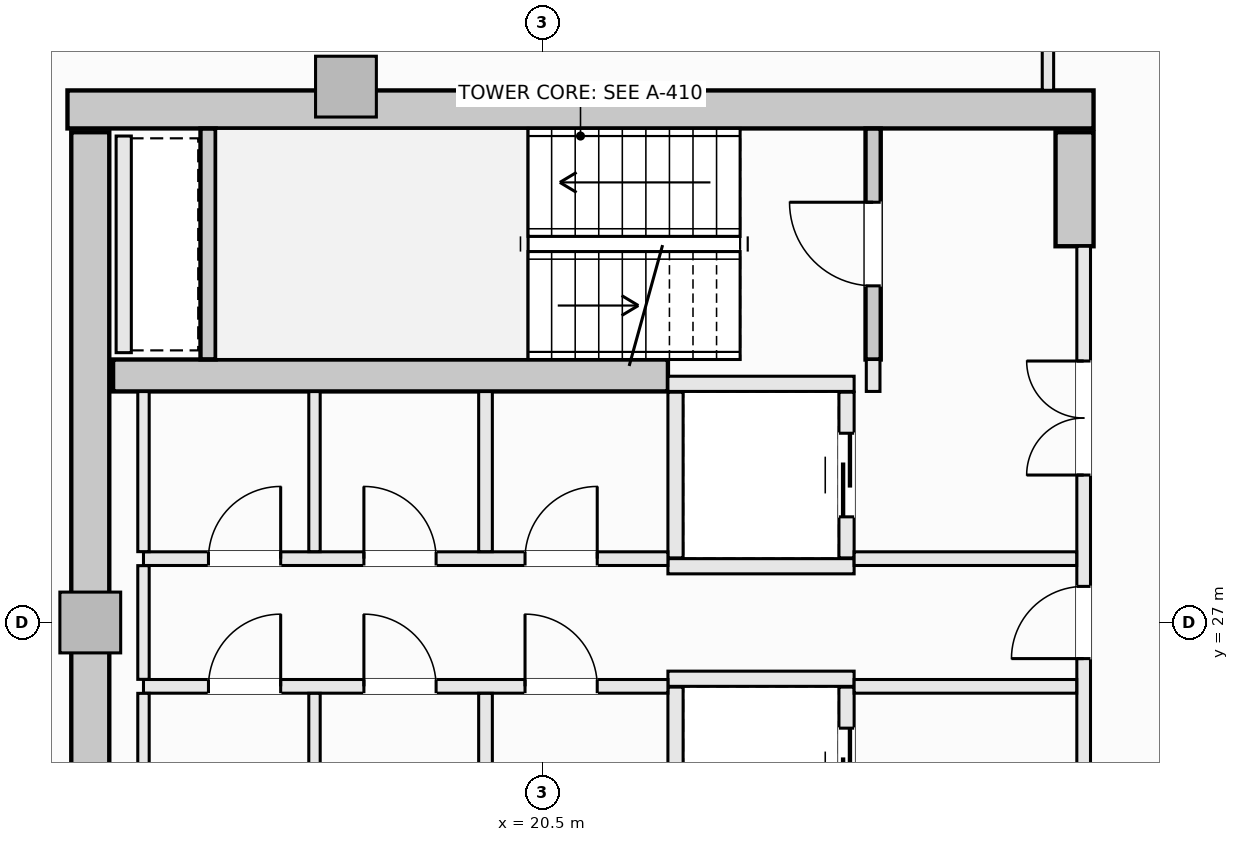
"""IFC4 building model, lengths in metres.
Left out: names, types, materials, properties, quantities, classifications, styles, units other than length and angle.
Written with IfcOpenShell. Run it as: python <this file> out.ifc"""

import sys

from ifc_helpers import new_model, si_unit, direction, frame, frame_2d, origin, origin_2d, place, context, subcontext, project, spatial, rectangle, extrude, element, fill, save


model = new_model("IFC4")
c1 = context("Model", 3, precision=1e-05, world=origin(), true_north=direction((0.0, 1.0)))
c2 = subcontext(c1, "Body", "Model", "MODEL_VIEW")
j1 = project(units=[si_unit("LENGTHUNIT", "METRE"), si_unit("PLANEANGLEUNIT", "RADIAN")], contexts=[c1])
p1 = place(None, origin())
s1 = spatial("IfcSite", under=j1, at=p1, CompositionType="ELEMENT")
p2 = place(p1, origin())
s2 = spatial("IfcBuilding", under=s1, at=p2, CompositionType="ELEMENT")
p3 = place(p2, frame((0.0, 0.0, 245.9)))
s3 = spatial("IfcBuildingStorey", under=s2, at=p3, CompositionType="ELEMENT", Elevation=245.9)
p4 = place(p3, frame((14.25, 33.75, -0.27), z_axis=(0.0, 0.0, 1.0), x_axis=(1.0, 0.0, 0.0)))
e1 = element("IfcWall", 1, at=p4, inside=s3, PredefinedType="SHEAR", context=c2, shape_type="SweptSolid", body=[
    extrude(rectangle(XDim=13.5, YDim=0.5, at=frame_2d((6.75, 0.0))), origin(), (0.0, 0.0, 1.0), 3.3),
])
p5 = place(p3, frame((14.55, 20.55, -0.27), z_axis=(0.0, 0.0, 1.0), x_axis=(0.0, 1.0, 0.0)))
e2 = element("IfcWall", 2, at=p5, inside=s3, PredefinedType="SHEAR", context=c2, shape_type="SweptSolid", body=[
    extrude(rectangle(XDim=12.9, YDim=0.5, at=frame_2d((6.45, 0.0))), origin(), (0.0, 0.0, 1.0), 3.3),
])
p6 = place(p3, frame((27.5, 31.95, -0.27), z_axis=(0.0, 0.0, 1.0), x_axis=(0.0, 1.0, 0.0)))
e3 = element("IfcWall", 3, at=p6, inside=s3, PredefinedType="SHEAR", context=c2, shape_type="SweptSolid", body=[
    extrude(rectangle(XDim=1.5, YDim=0.5, at=frame_2d((0.75, 0.0))), origin(), (0.0, 0.0, 1.0), 3.3),
])
p7 = place(p3, frame((14.85, 30.25, -0.27), z_axis=(0.0, 0.0, 1.0), x_axis=(1.0, 0.0, 0.0)))
e4 = element("IfcWall", 4, at=p7, inside=s3, PredefinedType="SHEAR", context=c2, shape_type="SweptSolid", body=[
    extrude(rectangle(XDim=7.3, YDim=0.42, at=frame_2d((3.65, 0.0))), origin(), (0.0, 0.0, 1.0), 3.3),
])
for number, where, z_axis, x_axis in (
    (5, (17.914, 34.05, -0.27), (0.0, 0.0, 1.0), (1.0, 0.0, 0.0)),
    (6, (14.55, 27.0, -0.27), (0.0, 0.0, 1.0), (1.0, 0.0, 0.0)),
):
    element("IfcColumn", number, at=place(p3, frame(where, z_axis=z_axis, x_axis=x_axis)), inside=s3, PredefinedType="PILASTER", context=c2, shape_type="SweptSolid", body=[
        extrude(rectangle(XDim=0.8, YDim=0.8, at=origin_2d()), origin(), (0.0, 0.0, 1.0), 3.3),
    ])
p8 = place(p3, frame((24.85, 30.46, -0.27), z_axis=(0.0, 0.0, 1.0), x_axis=(0.0, 1.0, 0.0)))
e7 = element("IfcWall", 7, at=p8, inside=s3, PredefinedType="SHEAR", context=c2, shape_type="SweptSolid", body=[
    extrude(rectangle(XDim=3.038, YDim=0.2, at=frame_2d((1.519, 0.0))), origin(), (0.0, 0.0, 1.0), 3.3),
])
p9 = place(p8, frame((0.969, 0.0, 0.27)))
e8 = element("IfcOpeningElement", 8, at=p9, cuts=e7, PredefinedType="OPENING", context=c2, shape_type="SweptSolid", body=[
    extrude(rectangle(XDim=1.1, YDim=2.15, at=frame_2d((0.55, 1.075))), frame((0.0, 0.11, 0.0), z_axis=(0.0, -1.0, 0.0), x_axis=(1.0, 0.0, 0.0)), (0.0, 0.0, 1.0), 0.22),
])
p10 = place(p3, frame((16.1, 30.462, -0.27), z_axis=(0.0, 0.0, 1.0), x_axis=(0.0, 1.0, 0.0)))
e9 = element("IfcWall", 9, at=p10, inside=s3, PredefinedType="SHEAR", context=c2, shape_type="SweptSolid", body=[
    extrude(rectangle(XDim=3.036, YDim=0.2, at=frame_2d((1.518, 0.0))), origin(), (0.0, 0.0, 1.0), 3.3),
])
for number, where, z_axis, x_axis in (
    (10, (22.15, 30.14, 0.0), (0.0, 0.0, 1.0), (1.0, 0.0, 0.0)),
    (11, (22.15, 27.74, 0.0), (0.0, 0.0, 1.0), (1.0, 0.0, 0.0)),
):
    element("IfcWall", number, at=place(p3, frame(where, z_axis=z_axis, x_axis=x_axis)), inside=s3, PredefinedType="SOLIDWALL", context=c2, shape_type="SweptSolid", body=[
        extrude(rectangle(XDim=2.45, YDim=0.2, at=frame_2d((1.225, 0.0))), origin(), (0.0, 0.0, 1.0), 3.03),
    ])
p11 = place(p3, frame((22.25, 27.85, 0.0), z_axis=(0.0, 0.0, 1.0), x_axis=(0.0, 1.0, 0.0)))
e12 = element("IfcWall", 12, at=p11, inside=s3, PredefinedType="SOLIDWALL", context=c2, shape_type="SweptSolid", body=[
    extrude(rectangle(XDim=2.18, YDim=0.2, at=frame_2d((1.09, 0.0))), origin(), (0.0, 0.0, 1.0), 3.03),
])
p12 = place(p3, frame((24.5, 27.85, 0.0), z_axis=(0.0, 0.0, 1.0), x_axis=(0.0, 1.0, 0.0)))
e13 = element("IfcWall", 13, at=p12, inside=s3, PredefinedType="SOLIDWALL", context=c2, shape_type="SweptSolid", body=[
    extrude(rectangle(XDim=2.18, YDim=0.2, at=frame_2d((1.09, 0.0))), origin(), (0.0, 0.0, 1.0), 3.03),
])
p13 = place(p12, frame((0.54, 0.0, 0.0)))
e14 = element("IfcOpeningElement", 14, at=p13, cuts=e13, PredefinedType="OPENING", context=c2, shape_type="SweptSolid", body=[
    extrude(rectangle(XDim=1.1, YDim=2.2, at=frame_2d((0.55, 1.1))), frame((0.0, 0.11, 0.0), z_axis=(0.0, -1.0, 0.0), x_axis=(1.0, 0.0, 0.0)), (0.0, 0.0, 1.0), 0.22),
])
p14 = place(p3, frame((22.15, 26.26, 0.0), z_axis=(0.0, 0.0, 1.0), x_axis=(1.0, 0.0, 0.0)))
e15 = element("IfcWall", 15, at=p14, inside=s3, PredefinedType="SOLIDWALL", context=c2, shape_type="SweptSolid", body=[
    extrude(rectangle(XDim=2.45, YDim=0.2, at=frame_2d((1.225, 0.0))), origin(), (0.0, 0.0, 1.0), 3.03),
])
p15 = place(p3, frame((22.25, 23.97, 0.0), z_axis=(0.0, 0.0, 1.0), x_axis=(0.0, 1.0, 0.0)))
e16 = element("IfcWall", 16, at=p15, inside=s3, PredefinedType="SOLIDWALL", context=c2, shape_type="SweptSolid", body=[
    extrude(rectangle(XDim=2.18, YDim=0.2, at=frame_2d((1.09, 0.0))), origin(), (0.0, 0.0, 1.0), 3.03),
])
p16 = place(p3, frame((24.5, 23.97, 0.0), z_axis=(0.0, 0.0, 1.0), x_axis=(0.0, 1.0, 0.0)))
e17 = element("IfcWall", 17, at=p16, inside=s3, PredefinedType="SOLIDWALL", context=c2, shape_type="SweptSolid", body=[
    extrude(rectangle(XDim=2.18, YDim=0.2, at=frame_2d((1.09, 0.0))), origin(), (0.0, 0.0, 1.0), 3.03),
])
p17 = place(p16, frame((0.54, 0.0, 0.0)))
e18 = element("IfcOpeningElement", 18, at=p17, cuts=e17, PredefinedType="OPENING", context=c2, shape_type="SweptSolid", body=[
    extrude(rectangle(XDim=1.1, YDim=2.2, at=frame_2d((0.55, 1.1))), frame((0.0, 0.11, 0.0), z_axis=(0.0, -1.0, 0.0), x_axis=(1.0, 0.0, 0.0)), (0.0, 0.0, 1.0), 0.22),
])
p18 = place(p3, frame((14.99, 30.55, 0.0), z_axis=(0.0, 0.0, 1.0), x_axis=(0.0, 1.0, 0.0)))
e19 = element("IfcWall", 19, at=p18, inside=s3, PredefinedType="SOLIDWALL", context=c2, shape_type="SweptSolid", body=[
    extrude(rectangle(XDim=2.85, YDim=0.2, at=frame_2d((1.425, 0.0))), origin(), (0.0, 0.0, 1.0), 3.03),
])
p19 = place(p3, frame((24.85, 30.04, 0.0), z_axis=(0.0, 0.0, 1.0), x_axis=(0.0, 1.0, 0.0)))
e20 = element("IfcWall", 20, at=p19, inside=s3, PredefinedType="SOLIDWALL", context=c2, shape_type="SweptSolid", body=[
    extrude(rectangle(XDim=0.42, YDim=0.18, at=frame_2d((0.21, 0.0))), origin(), (0.0, 0.0, 1.0), 3.03),
])
p20 = place(p3, frame((27.62, 22.05, 0.0), z_axis=(0.0, 0.0, 1.0), x_axis=(0.0, 1.0, 0.0)))
e21 = element("IfcWall", 21, at=p20, inside=s3, PredefinedType="SOLIDWALL", context=c2, shape_type="SweptSolid", body=[
    extrude(rectangle(XDim=9.9, YDim=0.18, at=frame_2d((4.95, 0.0))), origin(), (0.0, 0.0, 1.0), 3.03),
])
p21 = place(p20, frame((4.475, 0.0, 0.0)))
e22 = element("IfcOpeningElement", 22, at=p21, cuts=e21, PredefinedType="OPENING", context=c2, shape_type="SweptSolid", body=[
    extrude(rectangle(XDim=0.95, YDim=2.1, at=frame_2d((0.475, 1.05))), frame((0.0, 0.1, 0.0), z_axis=(0.0, -1.0, 0.0), x_axis=(1.0, 0.0, 0.0)), (0.0, 0.0, 1.0), 0.2),
])
p22 = place(p20, frame((6.89, 0.0, 0.0)))
e23 = element("IfcOpeningElement", 23, at=p22, cuts=e21, PredefinedType="OPENING", context=c2, shape_type="SweptSolid", body=[
    extrude(rectangle(XDim=1.5, YDim=2.2, at=frame_2d((0.75, 1.1))), frame((0.0, 0.1, 0.0), z_axis=(0.0, -1.0, 0.0), x_axis=(1.0, 0.0, 0.0)), (0.0, 0.0, 1.0), 0.2),
])
p23 = place(p20, frame((1.51, 0.0, 0.0)))
e24 = element("IfcOpeningElement", 24, at=p23, cuts=e21, PredefinedType="OPENING", context=c2, shape_type="SweptSolid", body=[
    extrude(rectangle(XDim=1.5, YDim=2.2, at=frame_2d((0.75, 1.1))), frame((0.0, 0.1, 0.0), z_axis=(0.0, -1.0, 0.0), x_axis=(1.0, 0.0, 0.0)), (0.0, 0.0, 1.0), 0.2),
])
p24 = place(p3, frame((15.25, 27.84, 0.0), z_axis=(0.0, 0.0, 1.0), x_axis=(1.0, 0.0, 0.0)))
e25 = element("IfcWall", 25, at=p24, inside=s3, PredefinedType="SOLIDWALL", context=c2, shape_type="SweptSolid", body=[
    extrude(rectangle(XDim=6.9, YDim=0.18, at=frame_2d((3.45, 0.0))), origin(), (0.0, 0.0, 1.0), 3.03),
])
p25 = place(p24, frame((5.02, 0.0, 0.0)))
e26 = element("IfcOpeningElement", 26, at=p25, cuts=e25, PredefinedType="OPENING", context=c2, shape_type="SweptSolid", body=[
    extrude(rectangle(XDim=0.95, YDim=2.1, at=frame_2d((0.475, 1.05))), frame((0.0, 0.1, 0.0), z_axis=(0.0, -1.0, 0.0), x_axis=(1.0, 0.0, 0.0)), (0.0, 0.0, 1.0), 0.2),
])
p26 = place(p24, frame((0.855, 0.0, 0.0)))
e27 = element("IfcOpeningElement", 27, at=p26, cuts=e25, PredefinedType="OPENING", context=c2, shape_type="SweptSolid", body=[
    extrude(rectangle(XDim=0.95, YDim=2.1, at=frame_2d((0.475, 1.05))), frame((0.0, 0.1, 0.0), z_axis=(0.0, -1.0, 0.0), x_axis=(1.0, 0.0, 0.0)), (0.0, 0.0, 1.0), 0.2),
])
p27 = place(p24, frame((2.9, 0.0, 0.0)))
e28 = element("IfcOpeningElement", 28, at=p27, cuts=e25, PredefinedType="OPENING", context=c2, shape_type="SweptSolid", body=[
    extrude(rectangle(XDim=0.95, YDim=2.1, at=frame_2d((0.475, 1.05))), frame((0.0, 0.1, 0.0), z_axis=(0.0, -1.0, 0.0), x_axis=(1.0, 0.0, 0.0)), (0.0, 0.0, 1.0), 0.2),
])
p28 = place(p3, frame((24.6, 27.84, 0.0), z_axis=(0.0, 0.0, 1.0), x_axis=(1.0, 0.0, 0.0)))
e29 = element("IfcWall", 29, at=p28, inside=s3, PredefinedType="SOLIDWALL", context=c2, shape_type="SweptSolid", body=[
    extrude(rectangle(XDim=2.928, YDim=0.18, at=frame_2d((1.464, 0.0))), origin(), (0.0, 0.0, 1.0), 3.03),
])
p29 = place(p3, frame((15.25, 26.16, 0.0), z_axis=(0.0, 0.0, 1.0), x_axis=(1.0, 0.0, 0.0)))
e30 = element("IfcWall", 30, at=p29, inside=s3, PredefinedType="SOLIDWALL", context=c2, shape_type="SweptSolid", body=[
    extrude(rectangle(XDim=6.9, YDim=0.18, at=frame_2d((3.45, 0.0))), origin(), (0.0, 0.0, 1.0), 3.03),
])
p30 = place(p29, frame((5.02, 0.0, 0.0)))
e31 = element("IfcOpeningElement", 31, at=p30, cuts=e30, PredefinedType="OPENING", context=c2, shape_type="SweptSolid", body=[
    extrude(rectangle(XDim=0.95, YDim=2.1, at=frame_2d((0.475, 1.05))), frame((0.0, 0.1, 0.0), z_axis=(0.0, -1.0, 0.0), x_axis=(1.0, 0.0, 0.0)), (0.0, 0.0, 1.0), 0.2),
])
p31 = place(p29, frame((0.855, 0.0, 0.0)))
e32 = element("IfcOpeningElement", 32, at=p31, cuts=e30, PredefinedType="OPENING", context=c2, shape_type="SweptSolid", body=[
    extrude(rectangle(XDim=0.95, YDim=2.1, at=frame_2d((0.475, 1.05))), frame((0.0, 0.1, 0.0), z_axis=(0.0, -1.0, 0.0), x_axis=(1.0, 0.0, 0.0)), (0.0, 0.0, 1.0), 0.2),
])
p32 = place(p29, frame((2.9, 0.0, 0.0)))
e33 = element("IfcOpeningElement", 33, at=p32, cuts=e30, PredefinedType="OPENING", context=c2, shape_type="SweptSolid", body=[
    extrude(rectangle(XDim=0.95, YDim=2.1, at=frame_2d((0.475, 1.05))), frame((0.0, 0.1, 0.0), z_axis=(0.0, -1.0, 0.0), x_axis=(1.0, 0.0, 0.0)), (0.0, 0.0, 1.0), 0.2),
])
p33 = place(p3, frame((24.6, 26.16, 0.0), z_axis=(0.0, 0.0, 1.0), x_axis=(1.0, 0.0, 0.0)))
e34 = element("IfcWall", 34, at=p33, inside=s3, PredefinedType="SOLIDWALL", context=c2, shape_type="SweptSolid", body=[
    extrude(rectangle(XDim=2.928, YDim=0.18, at=frame_2d((1.464, 0.0))), origin(), (0.0, 0.0, 1.0), 3.03),
])
p34 = place(p3, frame((15.25, 23.962, 0.0), z_axis=(0.0, 0.0, 1.0), x_axis=(0.0, 1.0, 0.0)))
e35 = element("IfcWall", 35, at=p34, inside=s3, PredefinedType="PARTITIONING", context=c2, shape_type="SweptSolid", body=[
    extrude(rectangle(XDim=2.106, YDim=0.15, at=frame_2d((1.053, 0.0))), origin(), (0.0, 0.0, 1.0), 3.03),
])
p35 = place(p3, frame((15.25, 26.252, 0.0), z_axis=(0.0, 0.0, 1.0), x_axis=(0.0, 1.0, 0.0)))
e36 = element("IfcWall", 36, at=p35, inside=s3, PredefinedType="PARTITIONING", context=c2, shape_type="SweptSolid", body=[
    extrude(rectangle(XDim=1.496, YDim=0.15, at=frame_2d((0.748, 0.0))), origin(), (0.0, 0.0, 1.0), 3.03),
])
p36 = place(p3, frame((15.25, 27.932, 0.0), z_axis=(0.0, 0.0, 1.0), x_axis=(0.0, 1.0, 0.0)))
e37 = element("IfcWall", 37, at=p36, inside=s3, PredefinedType="PARTITIONING", context=c2, shape_type="SweptSolid", body=[
    extrude(rectangle(XDim=2.106, YDim=0.15, at=frame_2d((1.053, 0.0))), origin(), (0.0, 0.0, 1.0), 3.03),
])
for number, where, z_axis, x_axis in (
    (38, (19.75, 23.962, 0.0), (0.0, 0.0, 1.0), (0.0, 1.0, 0.0)),
    (39, (19.75, 27.932, 0.0), (0.0, 0.0, 1.0), (0.0, 1.0, 0.0)),
):
    element("IfcWall", number, at=place(p3, frame(where, z_axis=z_axis, x_axis=x_axis)), inside=s3, PredefinedType="SOLIDWALL", context=c2, shape_type="SweptSolid", body=[
        extrude(rectangle(XDim=2.106, YDim=0.18, at=frame_2d((1.053, 0.0))), origin(), (0.0, 0.0, 1.0), 3.03),
    ])
for number, where, z_axis, x_axis in (
    (40, (17.5, 23.962, 0.0), (0.0, 0.0, 1.0), (0.0, 1.0, 0.0)),
    (41, (17.5, 27.932, 0.0), (0.0, 0.0, 1.0), (0.0, 1.0, 0.0)),
):
    element("IfcWall", number, at=place(p3, frame(where, z_axis=z_axis, x_axis=x_axis)), inside=s3, PredefinedType="PARTITIONING", context=c2, shape_type="SweptSolid", body=[
        extrude(rectangle(XDim=2.106, YDim=0.15, at=frame_2d((1.053, 0.0))), origin(), (0.0, 0.0, 1.0), 3.03),
    ])
p37 = place(p3, frame((27.15, 34.002, 0.0), z_axis=(0.0, 0.0, 1.0), x_axis=(0.0, 1.0, 0.0)))
e42 = element("IfcWall", 42, at=p37, inside=s3, PredefinedType="PARTITIONING", context=c2, shape_type="SweptSolid", body=[
    extrude(rectangle(XDim=4.198, YDim=0.15, at=frame_2d((2.099, 0.0))), origin(), (0.0, 0.0, 1.0), 3.03),
])
p38 = place(p37, frame((1.998, 0.0, 0.0)))
e43 = element("IfcOpeningElement", 43, at=p38, cuts=e42, PredefinedType="OPENING", context=c2, shape_type="SweptSolid", body=[
    extrude(rectangle(XDim=0.95, YDim=2.1, at=frame_2d((0.475, 1.05))), frame((0.0, 0.085, 0.0), z_axis=(0.0, -1.0, 0.0), x_axis=(1.0, 0.0, 0.0)), (0.0, 0.0, 1.0), 0.17),
])
p39 = place(p9, origin())
e44 = element("IfcDoor", 44, at=p39, inside=s3, OperationType="SINGLE_SWING_RIGHT", PredefinedType="DOOR", context=c2, shape_type="SweptSolid", body=[
    extrude(rectangle(XDim=1.1, YDim=2.15, at=frame_2d((0.55, 1.075))), frame((0.0, 0.025, 0.0), z_axis=(0.0, -1.0, 0.0), x_axis=(1.0, 0.0, 0.0)), (0.0, 0.0, 1.0), 0.05),
])
fill(e8, e44)
p40 = place(p13, origin())
e45 = element("IfcDoor", 45, at=p40, inside=s3, OperationType="SLIDING_TO_LEFT", PredefinedType="DOOR", context=c2, shape_type="SweptSolid", body=[
    extrude(rectangle(XDim=1.1, YDim=2.2, at=frame_2d((0.55, 1.1))), frame((0.0, 0.025, 0.0), z_axis=(0.0, -1.0, 0.0), x_axis=(1.0, 0.0, 0.0)), (0.0, 0.0, 1.0), 0.05),
])
fill(e14, e45)
p41 = place(p17, origin())
e46 = element("IfcDoor", 46, at=p41, inside=s3, OperationType="SLIDING_TO_LEFT", PredefinedType="DOOR", context=c2, shape_type="SweptSolid", body=[
    extrude(rectangle(XDim=1.1, YDim=2.2, at=frame_2d((0.55, 1.1))), frame((0.0, 0.025, 0.0), z_axis=(0.0, -1.0, 0.0), x_axis=(1.0, 0.0, 0.0)), (0.0, 0.0, 1.0), 0.05),
])
fill(e18, e46)
p42 = place(p21, origin())
e47 = element("IfcDoor", 47, at=p42, inside=s3, OperationType="SINGLE_SWING_LEFT", PredefinedType="DOOR", context=c2, shape_type="SweptSolid", body=[
    extrude(rectangle(XDim=0.95, YDim=2.1, at=frame_2d((0.475, 1.05))), frame((0.0, 0.025, 0.0), z_axis=(0.0, -1.0, 0.0), x_axis=(1.0, 0.0, 0.0)), (0.0, 0.0, 1.0), 0.05),
])
fill(e22, e47)
p43 = place(p22, origin())
e48 = element("IfcDoor", 48, at=p43, inside=s3, OperationType="DOUBLE_DOOR_SINGLE_SWING", PredefinedType="DOOR", context=c2, shape_type="SweptSolid", body=[
    extrude(rectangle(XDim=1.5, YDim=2.2, at=frame_2d((0.75, 1.1))), frame((0.0, 0.025, 0.0), z_axis=(0.0, -1.0, 0.0), x_axis=(1.0, 0.0, 0.0)), (0.0, 0.0, 1.0), 0.05),
])
fill(e23, e48)
p44 = place(p25, origin())
e49 = element("IfcDoor", 49, at=p44, inside=s3, OperationType="SINGLE_SWING_RIGHT", PredefinedType="DOOR", context=c2, shape_type="SweptSolid", body=[
    extrude(rectangle(XDim=0.95, YDim=2.1, at=frame_2d((0.475, 1.05))), frame((0.0, 0.025, 0.0), z_axis=(0.0, -1.0, 0.0), x_axis=(1.0, 0.0, 0.0)), (0.0, 0.0, 1.0), 0.05),
])
fill(e26, e49)
p45 = place(p30, origin())
e50 = element("IfcDoor", 50, at=p45, inside=s3, OperationType="SINGLE_SWING_LEFT", PredefinedType="DOOR", context=c2, shape_type="SweptSolid", body=[
    extrude(rectangle(XDim=0.95, YDim=2.1, at=frame_2d((0.475, 1.05))), frame((0.0, 0.025, 0.0), z_axis=(0.0, -1.0, 0.0), x_axis=(1.0, 0.0, 0.0)), (0.0, 0.0, 1.0), 0.05),
])
fill(e31, e50)
p46 = place(p26, origin())
e51 = element("IfcDoor", 51, at=p46, inside=s3, OperationType="SINGLE_SWING_RIGHT", PredefinedType="DOOR", context=c2, shape_type="SweptSolid", body=[
    extrude(rectangle(XDim=0.95, YDim=2.1, at=frame_2d((0.475, 1.05))), frame((0.0, 0.025, 0.0), z_axis=(0.0, -1.0, 0.0), x_axis=(1.0, 0.0, 0.0)), (0.0, 0.0, 1.0), 0.05),
])
fill(e27, e51)
p47 = place(p27, origin())
e52 = element("IfcDoor", 52, at=p47, inside=s3, OperationType="SINGLE_SWING_LEFT", PredefinedType="DOOR", context=c2, shape_type="SweptSolid", body=[
    extrude(rectangle(XDim=0.95, YDim=2.1, at=frame_2d((0.475, 1.05))), frame((0.0, 0.025, 0.0), z_axis=(0.0, -1.0, 0.0), x_axis=(1.0, 0.0, 0.0)), (0.0, 0.0, 1.0), 0.05),
])
fill(e28, e52)
p48 = place(p31, origin())
e53 = element("IfcDoor", 53, at=p48, inside=s3, OperationType="SINGLE_SWING_RIGHT", PredefinedType="DOOR", context=c2, shape_type="SweptSolid", body=[
    extrude(rectangle(XDim=0.95, YDim=2.1, at=frame_2d((0.475, 1.05))), frame((0.0, 0.025, 0.0), z_axis=(0.0, -1.0, 0.0), x_axis=(1.0, 0.0, 0.0)), (0.0, 0.0, 1.0), 0.05),
])
fill(e32, e53)
p49 = place(p32, origin())
e54 = element("IfcDoor", 54, at=p49, inside=s3, OperationType="SINGLE_SWING_LEFT", PredefinedType="DOOR", context=c2, shape_type="SweptSolid", body=[
    extrude(rectangle(XDim=0.95, YDim=2.1, at=frame_2d((0.475, 1.05))), frame((0.0, 0.025, 0.0), z_axis=(0.0, -1.0, 0.0), x_axis=(1.0, 0.0, 0.0)), (0.0, 0.0, 1.0), 0.05),
])
fill(e33, e54)
save(model, sys.argv[1])
